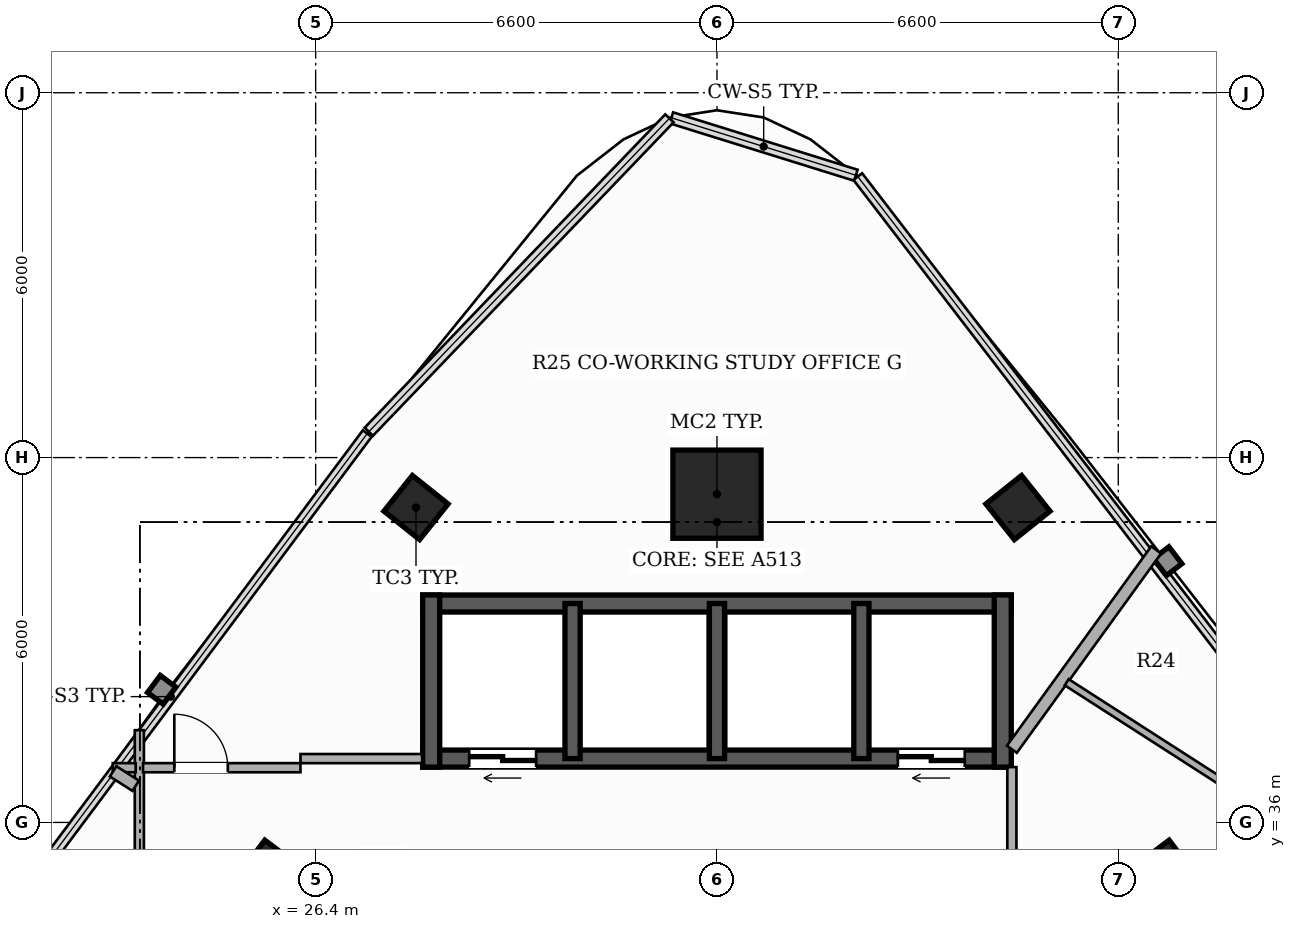
"""IFC4 building model, lengths in metres.
Left out: names, types, materials, properties, quantities, classifications, styles, units other than length and angle.
Written with IfcOpenShell. Run it as: python <this file> out.ifc"""

import sys

from ifc_helpers import new_model, si_unit, direction, frame, frame_2d, origin, origin_2d, place, context, subcontext, project, spatial, rectangle, hollow_rectangle, extrude, element, fill, save


model = new_model("IFC4")
c1 = context("Model", 3, precision=1e-05, world=origin(), true_north=direction((0.0, 1.0)))
c2 = subcontext(c1, "Body", "Model", "MODEL_VIEW")
j1 = project(units=[si_unit("LENGTHUNIT", "METRE"), si_unit("PLANEANGLEUNIT", "RADIAN")], contexts=[c1])
p1 = place(None, origin())
s1 = spatial("IfcSite", under=j1, at=p1, CompositionType="ELEMENT")
p2 = place(p1, origin())
s2 = spatial("IfcBuilding", under=s1, at=p2, CompositionType="ELEMENT")
p3 = place(p2, frame((0.0, 0.0, 173.75)))
s3 = spatial("IfcBuildingStorey", under=s2, at=p3, CompositionType="ELEMENT", Elevation=173.75)
p4 = place(p3, frame((37.84, 37.05, 0.0), z_axis=(0.0, 0.0, 1.0), x_axis=(-1.0, 0.0, 0.0)))
e1 = element("IfcWall", 1, at=p4, inside=s3, PredefinedType="SHEAR", context=c2, shape_type="SweptSolid", body=[
    extrude(rectangle(XDim=9.68, YDim=0.28, at=frame_2d((4.84, 0.0))), origin(), (0.0, 0.0, 1.0), 3.3),
])
p5 = place(p4, frame((7.815, 0.0, 0.0)))
e2 = element("IfcOpeningElement", 2, at=p5, cuts=e1, PredefinedType="OPENING", context=c2, shape_type="SweptSolid", body=[
    extrude(rectangle(XDim=1.1, YDim=2.2, at=frame_2d((0.55, 1.1))), frame((0.0, 0.15, 0.0), z_axis=(0.0, -1.0, 0.0), x_axis=(1.0, 0.0, 0.0)), (0.0, 0.0, 1.0), 0.3),
])
p6 = place(p4, frame((0.765, 0.0, 0.0)))
e3 = element("IfcOpeningElement", 3, at=p6, cuts=e1, PredefinedType="OPENING", context=c2, shape_type="SweptSolid", body=[
    extrude(rectangle(XDim=1.1, YDim=2.2, at=frame_2d((0.55, 1.1))), frame((0.0, 0.15, 0.0), z_axis=(0.0, -1.0, 0.0), x_axis=(1.0, 0.0, 0.0)), (0.0, 0.0, 1.0), 0.3),
])
p7 = place(p3, frame((28.16, 39.6, 0.0), z_axis=(0.0, 0.0, 1.0), x_axis=(1.0, 0.0, 0.0)))
e4 = element("IfcWall", 4, at=p7, inside=s3, PredefinedType="SHEAR", context=c2, shape_type="SweptSolid", body=[
    extrude(rectangle(XDim=9.68, YDim=0.28, at=frame_2d((4.84, 0.0))), origin(), (0.0, 0.0, 1.0), 3.3),
])
for number, where, z_axis, x_axis in (
    (5, (28.3, 36.91, 0.0), (0.0, 0.0, 1.0), (0.0, 1.0, 0.0)),
    (6, (37.7, 36.91, 0.0), (0.0, 0.0, 1.0), (0.0, 1.0, 0.0)),
):
    element("IfcWall", number, at=place(p3, frame(where, z_axis=z_axis, x_axis=x_axis)), inside=s3, PredefinedType="SHEAR", context=c2, shape_type="SweptSolid", body=[
        extrude(rectangle(XDim=2.83, YDim=0.28, at=frame_2d((1.415, 0.0))), origin(), (0.0, 0.0, 1.0), 3.3),
    ])
for number, where, z_axis, x_axis in (
    (7, (30.625, 37.05, 0.0), (0.0, 0.0, 1.0), (0.0, 1.0, 0.0)),
    (8, (33.0, 37.05, 0.0), (0.0, 0.0, 1.0), (0.0, 1.0, 0.0)),
    (9, (35.375, 37.05, 0.0), (0.0, 0.0, 1.0), (0.0, 1.0, 0.0)),
):
    element("IfcWall", number, at=place(p3, frame(where, z_axis=z_axis, x_axis=x_axis)), inside=s3, PredefinedType="SHEAR", context=c2, shape_type="SweptSolid", body=[
        extrude(rectangle(XDim=2.55, YDim=0.25, at=frame_2d((1.275, 0.0))), origin(), (0.0, 0.0, 1.0), 3.3),
    ])
p8 = place(p3, frame((33.0, 41.398, 0.0), z_axis=(0.0, 0.0, 1.0), x_axis=(1.0, 0.0, 0.0)))
e10 = element("IfcColumn", 10, at=p8, inside=s3, PredefinedType="COLUMN", context=c2, shape_type="SweptSolid", body=[
    extrude(hollow_rectangle(XDim=1.45, YDim=1.45, WallThickness=0.045, at=origin_2d()), origin(), (0.0, 0.0, 1.0), 3.3),
])
for number, where, z_axis, x_axis in (
    (11, (25.648, 35.113, 0.0), (0.0, 0.0, 1.0), (0.6, 0.8, 0.0)),
    (12, (40.352, 35.113, 0.0), (0.0, 0.0, 1.0), (-0.6, 0.8, 0.0)),
):
    element("IfcColumn", number, at=place(p3, frame(where, z_axis=z_axis, x_axis=x_axis)), inside=s3, PredefinedType="COLUMN", context=c2, shape_type="SweptSolid", body=[
        extrude(hollow_rectangle(XDim=0.85, YDim=0.85, WallThickness=0.028, at=origin_2d()), origin(), (0.0, 0.0, 1.0), 3.3),
    ])
for number, where, z_axis, x_axis in (
    (13, (28.05, 41.178, 0.0), (0.0, 0.0, 1.0), (0.624, 0.782, 0.0)),
    (14, (37.95, 41.178, 0.0), (0.0, 0.0, 1.0), (-0.624, 0.782, 0.0)),
):
    element("IfcColumn", number, at=place(p3, frame(where, z_axis=z_axis, x_axis=x_axis)), inside=s3, PredefinedType="COLUMN", context=c2, shape_type="SweptSolid", body=[
        extrude(hollow_rectangle(XDim=0.75, YDim=0.75, WallThickness=0.025, at=origin_2d()), origin(), (0.0, 0.0, 1.0), 3.3),
    ])
p9 = place(p3, frame((37.85, 34.65, 0.0), z_axis=(0.0, 0.0, 1.0), x_axis=(0.0, 1.0, 0.0)))
e15 = element("IfcWall", 15, at=p9, inside=s3, PredefinedType="PARTITIONING", context=c2, shape_type="SweptSolid", body=[
    extrude(rectangle(XDim=2.26, YDim=0.15, at=frame_2d((1.13, 0.0))), origin(), (0.0, 0.0, 1.0), 3.06),
])
p10 = place(p3, frame((23.5, 14.06, 0.0), z_axis=(0.0, 0.0, 1.0), x_axis=(0.0, 1.0, 0.0)))
e16 = element("IfcWall", 16, at=p10, inside=s3, PredefinedType="PARTITIONING", context=c2, shape_type="SweptSolid", body=[
    extrude(rectangle(XDim=23.457, YDim=0.15, at=frame_2d((11.729, 0.0))), origin(), (0.0, 0.0, 1.0), 2.413),
])
p11 = place(p10, frame((14.586, 0.0, 0.0)))
e17 = element("IfcOpeningElement", 17, at=p11, cuts=e16, PredefinedType="OPENING", context=c2, shape_type="SweptSolid", body=[
    extrude(rectangle(XDim=0.88, YDim=2.1, at=frame_2d((0.44, 1.05))), frame((0.0, 0.085, 0.0), z_axis=(0.0, -1.0, 0.0), x_axis=(1.0, 0.0, 0.0)), (0.0, 0.0, 1.0), 0.17),
])
p12 = place(p10, frame((3.483, 0.0, 0.0)))
e18 = element("IfcOpeningElement", 18, at=p12, cuts=e16, PredefinedType="OPENING", context=c2, shape_type="SweptSolid", body=[
    extrude(rectangle(XDim=0.92, YDim=2.15, at=frame_2d((0.46, 1.075))), frame((0.0, 0.085, 0.0), z_axis=(0.0, -1.0, 0.0), x_axis=(1.0, 0.0, 0.0)), (0.0, 0.0, 1.0), 0.17),
])
p13 = place(p3, frame((23.063, 36.9, 0.0), z_axis=(0.0, 0.0, 1.0), x_axis=(1.0, 0.0, 0.0)))
e19 = element("IfcWall", 19, at=p13, inside=s3, PredefinedType="PARTITIONING", context=c2, shape_type="SweptSolid", body=[
    extrude(rectangle(XDim=0.377, YDim=0.15, at=frame_2d((0.188, 0.0))), origin(), (0.0, 0.0, 1.0), 3.06),
])
p14 = place(p3, frame((23.56, 36.9, 0.0), z_axis=(0.0, 0.0, 1.0), x_axis=(1.0, 0.0, 0.0)))
e20 = element("IfcWall", 20, at=p14, inside=s3, PredefinedType="PARTITIONING", context=c2, shape_type="SweptSolid", body=[
    extrude(rectangle(XDim=2.59, YDim=0.15, at=frame_2d((1.295, 0.0))), origin(), (0.0, 0.0, 1.0), 2.413),
])
p15 = place(p14, frame((0.515, 0.0, 0.0)))
e21 = element("IfcOpeningElement", 21, at=p15, cuts=e20, PredefinedType="OPENING", context=c2, shape_type="SweptSolid", body=[
    extrude(rectangle(XDim=0.88, YDim=2.1, at=frame_2d((0.44, 1.05))), frame((0.0, 0.085, 0.0), z_axis=(0.0, -1.0, 0.0), x_axis=(1.0, 0.0, 0.0)), (0.0, 0.0, 1.0), 0.17),
])
p16 = place(p3, frame((26.15, 37.05, 0.0), z_axis=(0.0, 0.0, 1.0), x_axis=(1.0, 0.0, 0.0)))
e22 = element("IfcWall", 22, at=p16, inside=s3, PredefinedType="PARTITIONING", context=c2, shape_type="SweptSolid", body=[
    extrude(rectangle(XDim=2.0, YDim=0.15, at=frame_2d((1.0, 0.0))), origin(), (0.0, 0.0, 1.0), 2.413),
])
p17 = place(p3, frame((23.069, 36.84, 0.0), z_axis=(0.0, 0.0, 1.0), x_axis=(0.842563414195, -0.538597152852, 0.0)))
e23 = element("IfcWall", 23, at=p17, inside=s3, PredefinedType="PARTITIONING", context=c2, shape_type="SweptSolid", body=[
    extrude(rectangle(XDim=0.44, YDim=0.2, at=frame_2d((0.22, 0.0))), origin(), (0.0, 0.0, 1.0), 3.06),
])
p18 = place(p3, frame((37.85, 37.203, 0.0), z_axis=(0.0, 0.0, 1.0), x_axis=(0.586236886407, 0.810139687348, 0.0)))
e24 = element("IfcWall", 24, at=p18, inside=s3, PredefinedType="PARTITIONING", context=c2, shape_type="SweptSolid", body=[
    extrude(rectangle(XDim=4.048, YDim=0.2, at=frame_2d((2.024, 0.0))), origin(), (0.0, 0.0, 1.0), 2.413),
])
p19 = place(p3, frame((38.752, 38.305, 0.0), z_axis=(0.0, 0.0, 1.0), x_axis=(0.84140799898, -0.54040038791, 0.0)))
e25 = element("IfcWall", 25, at=p19, inside=s3, PredefinedType="PARTITIONING", context=c2, shape_type="SweptSolid", body=[
    extrude(rectangle(XDim=7.013, YDim=0.12, at=frame_2d((3.507, 0.0))), origin(), (0.0, 0.0, 1.0), 2.413),
])
p20 = place(p19, frame((3.816, 0.0, 0.0)))
e26 = element("IfcOpeningElement", 26, at=p20, cuts=e25, PredefinedType="OPENING", context=c2, shape_type="SweptSolid", body=[
    extrude(rectangle(XDim=0.88, YDim=2.1, at=frame_2d((0.44, 1.05))), frame((0.0, 0.07, 0.0), z_axis=(0.0, -1.0, 0.0), x_axis=(1.0, 0.0, 0.0)), (0.0, 0.0, 1.0), 0.14),
])
p21 = place(p5, origin())
e27 = element("IfcDoor", 27, at=p21, inside=s3, OperationType="DOUBLE_DOOR_SLIDING", PredefinedType="DOOR", context=c2, shape_type="SweptSolid", body=[
    extrude(rectangle(XDim=1.1, YDim=2.2, at=frame_2d((0.55, 1.1))), frame((0.0, 0.025, 0.0), z_axis=(0.0, -1.0, 0.0), x_axis=(1.0, 0.0, 0.0)), (0.0, 0.0, 1.0), 0.05),
])
fill(e2, e27)
p22 = place(p6, origin())
e28 = element("IfcDoor", 28, at=p22, inside=s3, OperationType="DOUBLE_DOOR_SLIDING", PredefinedType="DOOR", context=c2, shape_type="SweptSolid", body=[
    extrude(rectangle(XDim=1.1, YDim=2.2, at=frame_2d((0.55, 1.1))), frame((0.0, 0.025, 0.0), z_axis=(0.0, -1.0, 0.0), x_axis=(1.0, 0.0, 0.0)), (0.0, 0.0, 1.0), 0.05),
])
fill(e3, e28)
p23 = place(p15, origin())
e29 = element("IfcDoor", 29, at=p23, inside=s3, OperationType="SINGLE_SWING_LEFT", PredefinedType="DOOR", context=c2, shape_type="SweptSolid", body=[
    extrude(rectangle(XDim=0.88, YDim=2.1, at=frame_2d((0.44, 1.05))), frame((0.0, 0.025, 0.0), z_axis=(0.0, -1.0, 0.0), x_axis=(1.0, 0.0, 0.0)), (0.0, 0.0, 1.0), 0.05),
])
fill(e21, e29)
save(model, sys.argv[1])
